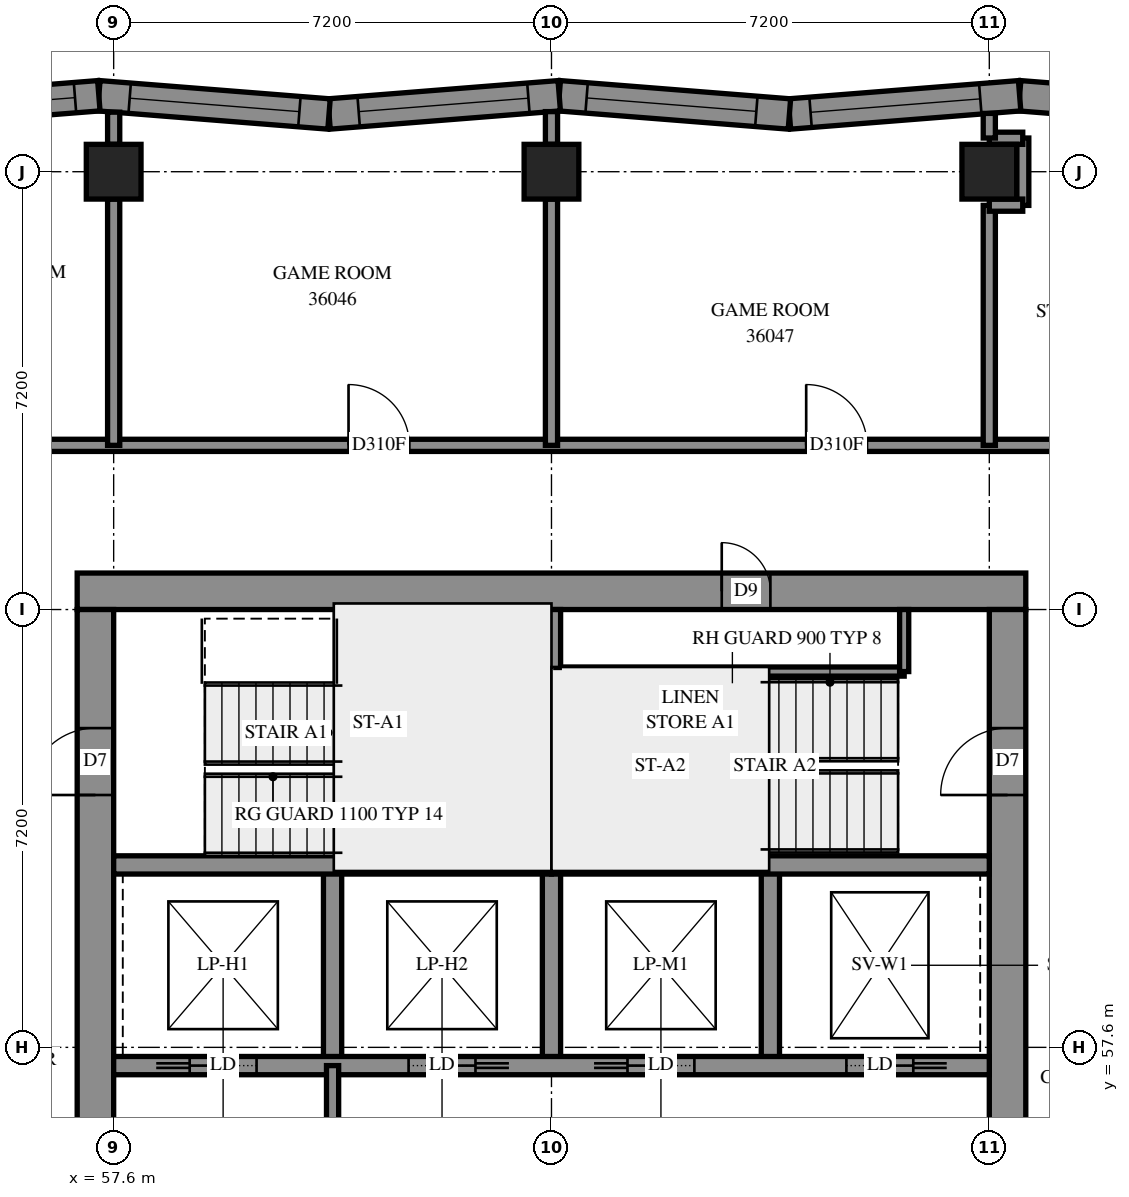
"""IFC4 building model, lengths in metres.
Left out: names, types, materials, properties, quantities, classifications, styles, units other than length and angle.
Written with IfcOpenShell. Run it as: python <this file> out.ifc"""

import sys

from ifc_helpers import new_model, si_unit, direction, frame, frame_2d, origin, origin_2d, place, context, subcontext, project, spatial, polyline, rectangle, outline, extrude, element, fill, save


model = new_model("IFC4")
c1 = context("Model", 3, precision=1e-05, world=origin(), true_north=direction((0.0, 1.0)))
c2 = subcontext(c1, "Body", "Model", "MODEL_VIEW")
j1 = project(units=[si_unit("LENGTHUNIT", "METRE"), si_unit("PLANEANGLEUNIT", "RADIAN")], contexts=[c1])
p1 = place(None, origin())
s1 = spatial("IfcSite", under=j1, at=p1, CompositionType="ELEMENT")
p2 = place(p1, origin())
s2 = spatial("IfcBuilding", under=s1, at=p2, CompositionType="ELEMENT")
p3 = place(p2, frame((0.0, 0.0, 135.4)))
s3 = spatial("IfcBuildingStorey", under=s2, at=p3, CompositionType="ELEMENT", Elevation=135.4)
for number, where, z_axis, x_axis in (
    (1, (57.6, 72.0, 0.0), (0.0, 0.0, 1.0), (1.0, 0.0, 0.0)),
    (2, (64.8, 72.0, 0.0), (0.0, 0.0, 1.0), (1.0, 0.0, 0.0)),
    (3, (72.0, 72.0, 0.0), (0.0, 0.0, 1.0), (1.0, 0.0, 0.0)),
):
    element("IfcColumn", number, at=place(p3, frame(where, z_axis=z_axis, x_axis=x_axis)), inside=s3, PredefinedType="COLUMN", context=c2, shape_type="SweptSolid", body=[
        extrude(rectangle(XDim=0.9, YDim=0.9, at=origin_2d()), origin(), (0.0, 0.0, 1.0), 3.1),
    ])
p4 = place(p3, frame((57.0, 65.1, -0.3), z_axis=(0.0, 0.0, 1.0), x_axis=(1.0, 0.0, 0.0)))
e4 = element("IfcWall", 4, at=p4, inside=s3, PredefinedType="SHEAR", context=c2, shape_type="SweptSolid", body=[
    extrude(rectangle(XDim=15.6, YDim=0.6, at=frame_2d((7.8, 0.0))), origin(), (0.0, 0.0, 1.0), 2.7),
])
p5 = place(p4, frame((10.6, 0.0, 0.3)))
e5 = element("IfcOpeningElement", 5, at=p5, cuts=e4, PredefinedType="OPENING", context=c2, shape_type="SweptSolid", body=[
    extrude(rectangle(XDim=0.8, YDim=2.1, at=frame_2d((0.4, 1.05))), frame((0.0, 0.31, 0.0), z_axis=(0.0, -1.0, 0.0), x_axis=(1.0, 0.0, 0.0)), (0.0, 0.0, 1.0), 0.62),
])
p6 = place(p3, frame((57.3, 50.4, -0.3), z_axis=(0.0, 0.0, 1.0), x_axis=(0.0, 1.0, 0.0)))
e6 = element("IfcWall", 6, at=p6, inside=s3, PredefinedType="SHEAR", context=c2, shape_type="SweptSolid", body=[
    extrude(rectangle(XDim=14.4, YDim=0.6, at=frame_2d((7.2, 0.0))), origin(), (0.0, 0.0, 1.0), 2.7),
])
p7 = place(p6, frame((4.55, 0.0, 0.3)))
e7 = element("IfcOpeningElement", 7, at=p7, cuts=e6, PredefinedType="OPENING", context=c2, shape_type="SweptSolid", body=[
    extrude(rectangle(XDim=1.1, YDim=2.1, at=frame_2d((0.55, 1.05))), frame((0.0, 0.31, 0.0), z_axis=(0.0, -1.0, 0.0), x_axis=(1.0, 0.0, 0.0)), (0.0, 0.0, 1.0), 0.62),
])
p8 = place(p6, frame((11.35, 0.0, 0.3)))
e8 = element("IfcOpeningElement", 8, at=p8, cuts=e6, PredefinedType="OPENING", context=c2, shape_type="SweptSolid", body=[
    extrude(rectangle(XDim=1.1, YDim=2.1, at=frame_2d((0.55, 1.05))), frame((0.0, 0.31, 0.0), z_axis=(0.0, -1.0, 0.0), x_axis=(1.0, 0.0, 0.0)), (0.0, 0.0, 1.0), 0.62),
])
p9 = place(p3, frame((72.3, 50.4, -0.3), z_axis=(0.0, 0.0, 1.0), x_axis=(0.0, 1.0, 0.0)))
e9 = element("IfcWall", 9, at=p9, inside=s3, PredefinedType="SHEAR", context=c2, shape_type="SweptSolid", body=[
    extrude(rectangle(XDim=14.4, YDim=0.6, at=frame_2d((7.2, 0.0))), origin(), (0.0, 0.0, 1.0), 2.7),
])
p10 = place(p9, frame((4.55, 0.0, 0.3)))
e10 = element("IfcOpeningElement", 10, at=p10, cuts=e9, PredefinedType="OPENING", context=c2, shape_type="SweptSolid", body=[
    extrude(rectangle(XDim=1.1, YDim=2.1, at=frame_2d((0.55, 1.05))), frame((0.0, 0.31, 0.0), z_axis=(0.0, -1.0, 0.0), x_axis=(1.0, 0.0, 0.0)), (0.0, 0.0, 1.0), 0.62),
])
p11 = place(p9, frame((11.35, 0.0, 0.3)))
e11 = element("IfcOpeningElement", 11, at=p11, cuts=e9, PredefinedType="OPENING", context=c2, shape_type="SweptSolid", body=[
    extrude(rectangle(XDim=1.1, YDim=2.1, at=frame_2d((0.55, 1.05))), frame((0.0, 0.31, 0.0), z_axis=(0.0, -1.0, 0.0), x_axis=(1.0, 0.0, 0.0)), (0.0, 0.0, 1.0), 0.62),
])
for number, where, z_axis, x_axis in (
    (12, (61.2, 57.3, 0.0), (0.0, 0.0, 1.0), (0.0, 1.0, 0.0)),
    (13, (64.8, 57.3, 0.0), (0.0, 0.0, 1.0), (0.0, 1.0, 0.0)),
    (14, (68.4, 57.3, 0.0), (0.0, 0.0, 1.0), (0.0, 1.0, 0.0)),
):
    element("IfcWall", number, at=place(p3, frame(where, z_axis=z_axis, x_axis=x_axis)), inside=s3, PredefinedType="SOLIDWALL", context=c2, shape_type="SweptSolid", body=[
        extrude(rectangle(XDim=3.3, YDim=0.3, at=frame_2d((1.65, 0.0))), origin(), (0.0, 0.0, 1.0), 3.1),
    ])
p12 = place(p3, frame((57.6, 57.3, 0.0), z_axis=(0.0, 0.0, 1.0), x_axis=(1.0, 0.0, 0.0)))
e15 = element("IfcWall", 15, at=p12, inside=s3, PredefinedType="SOLIDWALL", context=c2, shape_type="SweptSolid", body=[
    extrude(rectangle(XDim=14.4, YDim=0.3, at=frame_2d((7.2, 0.0))), origin(), (0.0, 0.0, 1.0), 3.1),
])
p13 = place(p12, frame((1.25, 0.0, 0.0)))
e16 = element("IfcOpeningElement", 16, at=p13, cuts=e15, PredefinedType="OPENING", context=c2, shape_type="SweptSolid", body=[
    extrude(rectangle(XDim=1.1, YDim=2.1, at=frame_2d((0.55, 1.05))), frame((0.0, 0.16, 0.0), z_axis=(0.0, -1.0, 0.0), x_axis=(1.0, 0.0, 0.0)), (0.0, 0.0, 1.0), 0.32),
])
p14 = place(p12, frame((4.85, 0.0, 0.0)))
e17 = element("IfcOpeningElement", 17, at=p14, cuts=e15, PredefinedType="OPENING", context=c2, shape_type="SweptSolid", body=[
    extrude(rectangle(XDim=1.1, YDim=2.1, at=frame_2d((0.55, 1.05))), frame((0.0, 0.16, 0.0), z_axis=(0.0, -1.0, 0.0), x_axis=(1.0, 0.0, 0.0)), (0.0, 0.0, 1.0), 0.32),
])
p15 = place(p12, frame((8.45, 0.0, 0.0)))
e18 = element("IfcOpeningElement", 18, at=p15, cuts=e15, PredefinedType="OPENING", context=c2, shape_type="SweptSolid", body=[
    extrude(rectangle(XDim=1.1, YDim=2.1, at=frame_2d((0.55, 1.05))), frame((0.0, 0.16, 0.0), z_axis=(0.0, -1.0, 0.0), x_axis=(1.0, 0.0, 0.0)), (0.0, 0.0, 1.0), 0.32),
])
p16 = place(p12, frame((12.05, 0.0, 0.0)))
e19 = element("IfcOpeningElement", 19, at=p16, cuts=e15, PredefinedType="OPENING", context=c2, shape_type="SweptSolid", body=[
    extrude(rectangle(XDim=1.1, YDim=2.1, at=frame_2d((0.55, 1.05))), frame((0.0, 0.16, 0.0), z_axis=(0.0, -1.0, 0.0), x_axis=(1.0, 0.0, 0.0)), (0.0, 0.0, 1.0), 0.32),
])
for number, where, z_axis, x_axis in (
    (20, (57.6, 60.6, 0.0), (0.0, 0.0, 1.0), (1.0, 0.0, 0.0)),
    (21, (64.8, 60.6, 0.0), (0.0, 0.0, 1.0), (1.0, 0.0, 0.0)),
):
    element("IfcWall", number, at=place(p3, frame(where, z_axis=z_axis, x_axis=x_axis)), inside=s3, PredefinedType="SOLIDWALL", context=c2, shape_type="SweptSolid", body=[
        extrude(rectangle(XDim=7.2, YDim=0.3, at=frame_2d((3.6, 0.0))), origin(), (0.0, 0.0, 1.0), 3.1),
    ])
p17 = place(p3, frame((64.8, 60.6, 0.0), z_axis=(0.0, 0.0, 1.0), x_axis=(0.0, 1.0, 0.0)))
e22 = element("IfcWall", 22, at=p17, inside=s3, PredefinedType="SOLIDWALL", context=c2, shape_type="SweptSolid", body=[
    extrude(rectangle(XDim=4.2, YDim=0.3, at=frame_2d((2.1, 0.0))), origin(), (0.0, 0.0, 1.0), 3.1),
])
p18 = place(p3, frame((76.304, 72.948, 0.0), z_axis=(0.0, 0.0, 1.0), x_axis=(-0.9968755515, 0.0789881945, 0.0)))
e23 = element("IfcWall", 23, at=p18, inside=s3, PredefinedType="SOLIDWALL", context=c2, shape_type="SweptSolid", body=[
    extrude(outline(polyline([(0.039, -0.25), (3.837, -0.25), (3.797, 0.25), (-0.039, 0.25), (0.039, -0.25)])), origin(), (0.0, 0.0, 1.0), 3.1),
])
p19 = place(p18, frame((1.552, 0.0, 0.45)))
e24 = element("IfcOpeningElement", 24, at=p19, cuts=e23, PredefinedType="OPENING", context=c2, shape_type="SweptSolid", body=[
    extrude(rectangle(XDim=1.2, YDim=2.5, at=frame_2d((0.6, 1.25))), frame((0.0, 0.26, 0.0), z_axis=(0.0, -1.0, 0.0), x_axis=(1.0, 0.0, 0.0)), (0.0, 0.0, 1.0), 0.52),
])
p20 = place(p3, frame((72.499, 73.249, 0.0), z_axis=(0.0, 0.0, 1.0), x_axis=(-0.9968747806, -0.0789979222, 0.0)))
e25 = element("IfcWall", 25, at=p20, inside=s3, PredefinedType="SOLIDWALL", context=c2, shape_type="SweptSolid", body=[
    extrude(outline(polyline([(-0.02, -0.25), (3.778, -0.25), (3.817, 0.25), (0.02, 0.25), (-0.02, -0.25)])), origin(), (0.0, 0.0, 1.0), 3.1),
])
p21 = place(p20, frame((0.649, 0.0, 0.45)))
e26 = element("IfcOpeningElement", 26, at=p21, cuts=e25, PredefinedType="OPENING", context=c2, shape_type="SweptSolid", body=[
    extrude(rectangle(XDim=2.8, YDim=2.5, at=frame_2d((1.4, 1.25))), frame((0.0, 0.26, 0.0), z_axis=(0.0, -1.0, 0.0), x_axis=(1.0, 0.0, 0.0)), (0.0, 0.0, 1.0), 0.52),
])
p22 = place(p3, frame((68.713, 72.949, 0.0), z_axis=(0.0, 0.0, 1.0), x_axis=(-0.9968746163, 0.078999996, 0.0)))
e27 = element("IfcWall", 27, at=p22, inside=s3, PredefinedType="SOLIDWALL", context=c2, shape_type="SweptSolid", body=[
    extrude(outline(polyline([(0.02, -0.25), (3.817, -0.25), (3.778, 0.25), (-0.02, 0.25), (0.02, -0.25)])), origin(), (0.0, 0.0, 1.0), 3.1),
])
p23 = place(p22, frame((0.546, 0.0, 0.45)))
e28 = element("IfcOpeningElement", 28, at=p23, cuts=e27, PredefinedType="OPENING", context=c2, shape_type="SweptSolid", body=[
    extrude(rectangle(XDim=2.8, YDim=2.5, at=frame_2d((1.4, 1.25))), frame((0.0, 0.26, 0.0), z_axis=(0.0, -1.0, 0.0), x_axis=(1.0, 0.0, 0.0)), (0.0, 0.0, 1.0), 0.52),
])
p24 = place(p3, frame((64.927, 73.249, 0.0), z_axis=(0.0, 0.0, 1.0), x_axis=(-0.9968746163, -0.078999996, 0.0)))
e29 = element("IfcWall", 29, at=p24, inside=s3, PredefinedType="SOLIDWALL", context=c2, shape_type="SweptSolid", body=[
    extrude(outline(polyline([(-0.02, -0.25), (3.778, -0.25), (3.817, 0.25), (0.02, 0.25), (-0.02, -0.25)])), origin(), (0.0, 0.0, 1.0), 3.1),
])
p25 = place(p24, frame((0.509, 0.0, 0.45)))
e30 = element("IfcOpeningElement", 30, at=p25, cuts=e29, PredefinedType="OPENING", context=c2, shape_type="SweptSolid", body=[
    extrude(rectangle(XDim=2.8, YDim=2.5, at=frame_2d((1.4, 1.25))), frame((0.0, 0.26, 0.0), z_axis=(0.0, -1.0, 0.0), x_axis=(1.0, 0.0, 0.0)), (0.0, 0.0, 1.0), 0.52),
])
p26 = place(p3, frame((61.142, 72.949, 0.0), z_axis=(0.0, 0.0, 1.0), x_axis=(-0.9968746163, 0.078999996, 0.0)))
e31 = element("IfcWall", 31, at=p26, inside=s3, PredefinedType="SOLIDWALL", context=c2, shape_type="SweptSolid", body=[
    extrude(outline(polyline([(0.02, -0.25), (3.817, -0.25), (3.778, 0.25), (-0.02, 0.25), (0.02, -0.25)])), origin(), (0.0, 0.0, 1.0), 3.1),
])
p27 = place(p26, frame((0.489, 0.0, 0.45)))
e32 = element("IfcOpeningElement", 32, at=p27, cuts=e31, PredefinedType="OPENING", context=c2, shape_type="SweptSolid", body=[
    extrude(rectangle(XDim=2.8, YDim=2.5, at=frame_2d((1.4, 1.25))), frame((0.0, 0.26, 0.0), z_axis=(0.0, -1.0, 0.0), x_axis=(1.0, 0.0, 0.0)), (0.0, 0.0, 1.0), 0.52),
])
p28 = place(p3, frame((57.356, 73.249, 0.0), z_axis=(0.0, 0.0, 1.0), x_axis=(-0.9968746163, -0.078999996, 0.0)))
e33 = element("IfcWall", 33, at=p28, inside=s3, PredefinedType="SOLIDWALL", context=c2, shape_type="SweptSolid", body=[
    extrude(outline(polyline([(-0.02, -0.25), (3.778, -0.25), (3.817, 0.25), (0.02, 0.25), (-0.02, -0.25)])), origin(), (0.0, 0.0, 1.0), 3.1),
])
p29 = place(p28, frame((0.393, 0.0, 0.45)))
e34 = element("IfcOpeningElement", 34, at=p29, cuts=e33, PredefinedType="OPENING", context=c2, shape_type="SweptSolid", body=[
    extrude(rectangle(XDim=2.8, YDim=2.5, at=frame_2d((1.4, 1.25))), frame((0.0, 0.26, 0.0), z_axis=(0.0, -1.0, 0.0), x_axis=(1.0, 0.0, 0.0)), (0.0, 0.0, 1.0), 0.52),
])
p30 = place(p3, frame((64.95, 63.78, 0.0), z_axis=(0.0, 0.0, 1.0), x_axis=(1.0, 0.0, 0.0)))
e35 = element("IfcWall", 35, at=p30, inside=s3, PredefinedType="PARTITIONING", context=c2, shape_type="SweptSolid", body=[
    extrude(rectangle(XDim=5.65, YDim=0.15, at=frame_2d((2.825, 0.0))), origin(), (0.0, 0.0, 1.0), 3.1),
])
p31 = place(p3, frame((70.6, 63.78, 0.0), z_axis=(0.0, 0.0, 1.0), x_axis=(0.0, 1.0, 0.0)))
e36 = element("IfcWall", 36, at=p31, inside=s3, PredefinedType="PARTITIONING", context=c2, shape_type="SweptSolid", body=[
    extrude(rectangle(XDim=1.02, YDim=0.15, at=frame_2d((0.51, 0.0))), origin(), (0.0, 0.0, 1.0), 3.1),
])
p32 = place(p3, frame((61.2, 53.7, 0.0), z_axis=(0.0, 0.0, 1.0), x_axis=(0.0, 1.0, 0.0)))
e37 = element("IfcWall", 37, at=p32, inside=s3, PredefinedType="PARTITIONING", context=c2, shape_type="SweptSolid", body=[
    extrude(rectangle(XDim=3.6, YDim=0.2, at=frame_2d((1.8, 0.0))), origin(), (0.0, 0.0, 1.0), 3.1),
])
p33 = place(p3, frame((54.9, 67.5, 0.0), z_axis=(0.0, 0.0, 1.0), x_axis=(1.0, 0.0, 0.0)))
e38 = element("IfcWall", 38, at=p33, inside=s3, PredefinedType="PARTITIONING", context=c2, shape_type="SweptSolid", body=[
    extrude(rectangle(XDim=19.8, YDim=0.2, at=frame_2d((9.9, 0.0))), origin(), (0.0, 0.0, 1.0), 3.1),
])
p34 = place(p33, frame((6.562, 0.0, 0.0)))
e39 = element("IfcOpeningElement", 39, at=p34, cuts=e38, PredefinedType="OPENING", context=c2, shape_type="SweptSolid", body=[
    extrude(rectangle(XDim=1.0, YDim=2.1, at=frame_2d((0.5, 1.05))), frame((0.0, 0.11, 0.0), z_axis=(0.0, -1.0, 0.0), x_axis=(1.0, 0.0, 0.0)), (0.0, 0.0, 1.0), 0.22),
])
p35 = place(p33, frame((14.089, 0.0, 0.0)))
e40 = element("IfcOpeningElement", 40, at=p35, cuts=e38, PredefinedType="OPENING", context=c2, shape_type="SweptSolid", body=[
    extrude(rectangle(XDim=1.0, YDim=2.1, at=frame_2d((0.5, 1.05))), frame((0.0, 0.11, 0.0), z_axis=(0.0, -1.0, 0.0), x_axis=(1.0, 0.0, 0.0)), (0.0, 0.0, 1.0), 0.22),
])
for number, where, z_axis, x_axis in (
    (41, (57.6, 67.5, 0.0), (0.0, 0.0, 1.0), (0.0, 1.0, 0.0)),
    (42, (64.8, 67.5, 0.0), (0.0, 0.0, 1.0), (0.0, 1.0, 0.0)),
):
    element("IfcWall", number, at=place(p3, frame(where, z_axis=z_axis, x_axis=x_axis)), inside=s3, PredefinedType="PARTITIONING", context=c2, shape_type="SweptSolid", body=[
        extrude(rectangle(XDim=4.05, YDim=0.2, at=frame_2d((2.025, 0.0))), origin(), (0.0, 0.0, 1.0), 3.1),
    ])
p36 = place(p3, frame((72.0, 67.5, 0.0), z_axis=(0.0, 0.0, 1.0), x_axis=(0.0, 1.0, 0.0)))
e43 = element("IfcWall", 43, at=p36, inside=s3, PredefinedType="PARTITIONING", context=c2, shape_type="SweptSolid", body=[
    extrude(rectangle(XDim=3.946, YDim=0.2, at=frame_2d((1.973, 0.0))), origin(), (0.0, 0.0, 1.0), 3.1),
])
p37 = place(p3, frame((72.55, 71.446, 0.0), z_axis=(0.0, 0.0, 1.0), x_axis=(0.0, 1.0, 0.0)))
e44 = element("IfcWall", 44, at=p37, inside=s3, PredefinedType="PARTITIONING", context=c2, shape_type="SweptSolid", body=[
    extrude(rectangle(XDim=1.108, YDim=0.2, at=frame_2d((0.554, 0.0))), origin(), (0.0, 0.0, 1.0), 3.1),
])
for number, where, z_axis, x_axis in (
    (45, (72.0, 71.45, 0.0), (0.0, 0.0, 1.0), (1.0, 0.0, 0.0)),
    (46, (72.0, 72.55, 0.0), (0.0, 0.0, 1.0), (1.0, 0.0, 0.0)),
):
    element("IfcWall", number, at=place(p3, frame(where, z_axis=z_axis, x_axis=x_axis)), inside=s3, PredefinedType="PARTITIONING", context=c2, shape_type="SweptSolid", body=[
        extrude(rectangle(XDim=0.55, YDim=0.2, at=frame_2d((0.275, 0.0))), origin(), (0.0, 0.0, 1.0), 3.1),
    ])
p38 = place(p3, frame((64.8, 72.45, 0.0), z_axis=(0.0, 0.0, 1.0), x_axis=(0.0, 1.0, 0.0)))
e47 = element("IfcWall", 47, at=p38, inside=s3, PredefinedType="PARTITIONING", context=c2, shape_type="SweptSolid", body=[
    extrude(rectangle(XDim=0.538, YDim=0.2, at=frame_2d((0.269, 0.0))), origin(), (0.0, 0.0, 1.0), 3.1),
])
p39 = place(p3, frame((57.6, 72.45, 0.0), z_axis=(0.0, 0.0, 1.0), x_axis=(0.0, 1.0, 0.0)))
e48 = element("IfcWall", 48, at=p39, inside=s3, PredefinedType="PARTITIONING", context=c2, shape_type="SweptSolid", body=[
    extrude(rectangle(XDim=0.529, YDim=0.2, at=frame_2d((0.265, 0.0))), origin(), (0.0, 0.0, 1.0), 3.1),
])
p40 = place(p3, frame((72.0, 72.554, 0.0), z_axis=(0.0, 0.0, 1.0), x_axis=(0.0, 1.0, 0.0)))
e49 = element("IfcWall", 49, at=p40, inside=s3, PredefinedType="PARTITIONING", context=c2, shape_type="SweptSolid", body=[
    extrude(rectangle(XDim=0.405, YDim=0.2, at=frame_2d((0.202, 0.0))), origin(), (0.0, 0.0, 1.0), 3.1),
])
p41 = place(p21, origin())
e50 = element("IfcWindow", 50, at=p41, inside=s3, PartitioningType="SINGLE_PANEL", PredefinedType="WINDOW", context=c2, shape_type="SweptSolid", body=[
    extrude(rectangle(XDim=2.8, YDim=2.5, at=frame_2d((1.4, 1.25))), frame((0.0, 0.18, 0.0), z_axis=(0.0, -1.0, 0.0), x_axis=(1.0, 0.0, 0.0)), (0.0, 0.0, 1.0), 0.06),
])
fill(e26, e50)
p42 = place(p23, origin())
e51 = element("IfcWindow", 51, at=p42, inside=s3, PartitioningType="SINGLE_PANEL", PredefinedType="WINDOW", context=c2, shape_type="SweptSolid", body=[
    extrude(rectangle(XDim=2.8, YDim=2.5, at=frame_2d((1.4, 1.25))), frame((0.0, 0.18, 0.0), z_axis=(0.0, -1.0, 0.0), x_axis=(1.0, 0.0, 0.0)), (0.0, 0.0, 1.0), 0.06),
])
fill(e28, e51)
p43 = place(p25, origin())
e52 = element("IfcWindow", 52, at=p43, inside=s3, PartitioningType="SINGLE_PANEL", PredefinedType="WINDOW", context=c2, shape_type="SweptSolid", body=[
    extrude(rectangle(XDim=2.8, YDim=2.5, at=frame_2d((1.4, 1.25))), frame((0.0, 0.18, 0.0), z_axis=(0.0, -1.0, 0.0), x_axis=(1.0, 0.0, 0.0)), (0.0, 0.0, 1.0), 0.06),
])
fill(e30, e52)
p44 = place(p27, origin())
e53 = element("IfcWindow", 53, at=p44, inside=s3, PartitioningType="SINGLE_PANEL", PredefinedType="WINDOW", context=c2, shape_type="SweptSolid", body=[
    extrude(rectangle(XDim=2.8, YDim=2.5, at=frame_2d((1.4, 1.25))), frame((0.0, 0.18, 0.0), z_axis=(0.0, -1.0, 0.0), x_axis=(1.0, 0.0, 0.0)), (0.0, 0.0, 1.0), 0.06),
])
fill(e32, e53)
p45 = place(p29, origin())
e54 = element("IfcWindow", 54, at=p45, inside=s3, PartitioningType="SINGLE_PANEL", PredefinedType="WINDOW", context=c2, shape_type="SweptSolid", body=[
    extrude(rectangle(XDim=2.8, YDim=2.5, at=frame_2d((1.4, 1.25))), frame((0.0, 0.18, 0.0), z_axis=(0.0, -1.0, 0.0), x_axis=(1.0, 0.0, 0.0)), (0.0, 0.0, 1.0), 0.06),
])
fill(e34, e54)
p46 = place(p5, origin())
e55 = element("IfcDoor", 55, at=p46, inside=s3, OperationType="SINGLE_SWING_RIGHT", PredefinedType="DOOR", context=c2, shape_type="SweptSolid", body=[
    extrude(rectangle(XDim=0.8, YDim=2.1, at=frame_2d((0.4, 1.05))), frame((0.0, 0.025, 0.0), z_axis=(0.0, -1.0, 0.0), x_axis=(1.0, 0.0, 0.0)), (0.0, 0.0, 1.0), 0.05),
])
fill(e5, e55)
p47 = place(p8, origin())
e56 = element("IfcDoor", 56, at=p47, inside=s3, OperationType="SINGLE_SWING_LEFT", PredefinedType="DOOR", context=c2, shape_type="SweptSolid", body=[
    extrude(rectangle(XDim=1.1, YDim=2.1, at=frame_2d((0.55, 1.05))), frame((0.0, 0.025, 0.0), z_axis=(0.0, -1.0, 0.0), x_axis=(1.0, 0.0, 0.0)), (0.0, 0.0, 1.0), 0.05),
])
fill(e8, e56)
p48 = place(p11, origin())
e57 = element("IfcDoor", 57, at=p48, inside=s3, OperationType="SINGLE_SWING_RIGHT", PredefinedType="DOOR", context=c2, shape_type="SweptSolid", body=[
    extrude(rectangle(XDim=1.1, YDim=2.1, at=frame_2d((0.55, 1.05))), frame((0.0, 0.025, 0.0), z_axis=(0.0, -1.0, 0.0), x_axis=(1.0, 0.0, 0.0)), (0.0, 0.0, 1.0), 0.05),
])
fill(e11, e57)
p49 = place(p13, origin())
e58 = element("IfcDoor", 58, at=p49, inside=s3, OperationType="SLIDING_TO_LEFT", PredefinedType="DOOR", context=c2, shape_type="SweptSolid", body=[
    extrude(rectangle(XDim=1.1, YDim=2.1, at=frame_2d((0.55, 1.05))), frame((0.0, 0.025, 0.0), z_axis=(0.0, -1.0, 0.0), x_axis=(1.0, 0.0, 0.0)), (0.0, 0.0, 1.0), 0.05),
])
fill(e16, e58)
p50 = place(p14, origin())
e59 = element("IfcDoor", 59, at=p50, inside=s3, OperationType="SLIDING_TO_RIGHT", PredefinedType="DOOR", context=c2, shape_type="SweptSolid", body=[
    extrude(rectangle(XDim=1.1, YDim=2.1, at=frame_2d((0.55, 1.05))), frame((0.0, 0.025, 0.0), z_axis=(0.0, -1.0, 0.0), x_axis=(1.0, 0.0, 0.0)), (0.0, 0.0, 1.0), 0.05),
])
fill(e17, e59)
p51 = place(p15, origin())
e60 = element("IfcDoor", 60, at=p51, inside=s3, OperationType="SLIDING_TO_LEFT", PredefinedType="DOOR", context=c2, shape_type="SweptSolid", body=[
    extrude(rectangle(XDim=1.1, YDim=2.1, at=frame_2d((0.55, 1.05))), frame((0.0, 0.025, 0.0), z_axis=(0.0, -1.0, 0.0), x_axis=(1.0, 0.0, 0.0)), (0.0, 0.0, 1.0), 0.05),
])
fill(e18, e60)
p52 = place(p16, origin())
e61 = element("IfcDoor", 61, at=p52, inside=s3, OperationType="SLIDING_TO_RIGHT", PredefinedType="DOOR", context=c2, shape_type="SweptSolid", body=[
    extrude(rectangle(XDim=1.1, YDim=2.1, at=frame_2d((0.55, 1.05))), frame((0.0, 0.025, 0.0), z_axis=(0.0, -1.0, 0.0), x_axis=(1.0, 0.0, 0.0)), (0.0, 0.0, 1.0), 0.05),
])
fill(e19, e61)
p53 = place(p34, origin())
e62 = element("IfcDoor", 62, at=p53, inside=s3, OperationType="SINGLE_SWING_RIGHT", PredefinedType="DOOR", context=c2, shape_type="SweptSolid", body=[
    extrude(rectangle(XDim=1.0, YDim=2.1, at=frame_2d((0.5, 1.05))), frame((0.0, 0.025, 0.0), z_axis=(0.0, -1.0, 0.0), x_axis=(1.0, 0.0, 0.0)), (0.0, 0.0, 1.0), 0.05),
])
fill(e39, e62)
p54 = place(p35, origin())
e63 = element("IfcDoor", 63, at=p54, inside=s3, OperationType="SINGLE_SWING_RIGHT", PredefinedType="DOOR", context=c2, shape_type="SweptSolid", body=[
    extrude(rectangle(XDim=1.0, YDim=2.1, at=frame_2d((0.5, 1.05))), frame((0.0, 0.025, 0.0), z_axis=(0.0, -1.0, 0.0), x_axis=(1.0, 0.0, 0.0)), (0.0, 0.0, 1.0), 0.05),
])
fill(e40, e63)
save(model, sys.argv[1])
